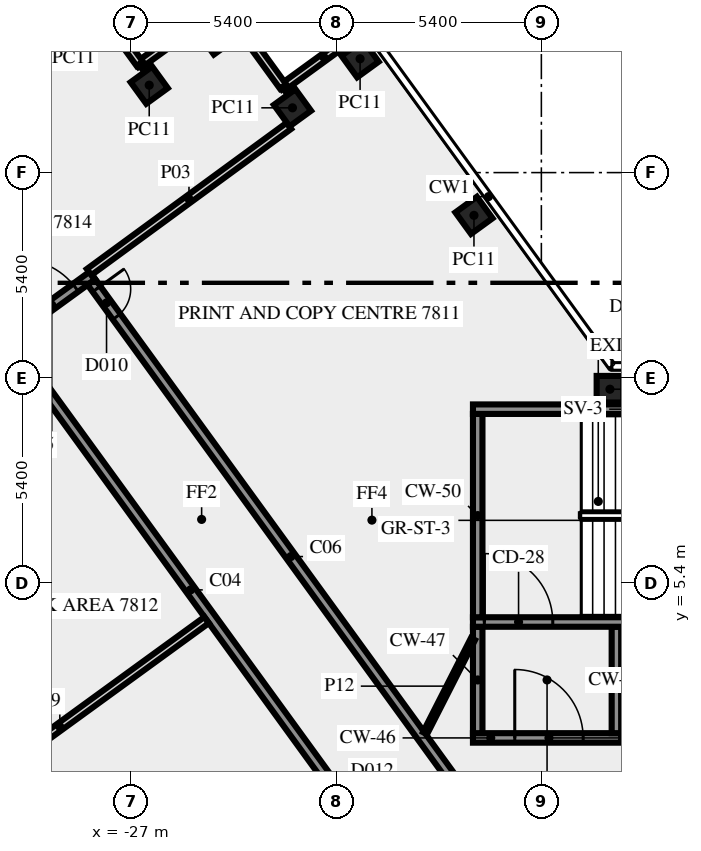
"""IFC4 building model, lengths in metres.
Left out: names, types, materials, properties, quantities, classifications, styles, units other than length and angle.
Written with IfcOpenShell. Run it as: python <this file> out.ifc"""

import sys

from ifc_helpers import new_model, si_unit, direction, frame, frame_2d, origin, origin_2d, place, context, subcontext, project, spatial, rectangle, extrude, element, fill, save


model = new_model("IFC4")
c1 = context("Model", 3, precision=1e-05, world=origin(), true_north=direction((0.0, 1.0)))
c2 = subcontext(c1, "Body", "Model", "MODEL_VIEW")
j1 = project(units=[si_unit("LENGTHUNIT", "METRE"), si_unit("PLANEANGLEUNIT", "RADIAN")], contexts=[c1])
p1 = place(None, origin())
s1 = spatial("IfcSite", under=j1, at=p1, CompositionType="ELEMENT")
p2 = place(p1, origin())
s2 = spatial("IfcBuilding", under=s1, at=p2, CompositionType="ELEMENT")
p3 = place(p2, frame((0.0, 0.0, 335.0)))
s3 = spatial("IfcBuildingStorey", under=s2, at=p3, CompositionType="ELEMENT", Elevation=335.0)
for number, where, z_axis, x_axis in (
    (1, (-17.974, 15.075, 0.0), (0.0, 0.0, 1.0), (-0.588, 0.809, 0.0)),
    (2, (-20.97, 19.195, 0.0), (0.0, 0.0, 1.0), (-0.588, 0.809, 0.0)),
    (3, (-22.749, 17.904, 0.0), (0.0, 0.0, 1.0), (-0.588, 0.809, 0.0)),
    (4, (-24.74, 19.795, 0.0), (0.0, 0.0, 1.0), (-0.588, 0.809, 0.0)),
    (5, (-26.519, 18.5, 0.0), (0.0, 0.0, 1.0), (-0.588, 0.809, 0.0)),
    (6, (-14.395, 10.5, 0.0), (0.0, 0.0, 1.0), (-1.0, 0.0, 0.0)),
):
    element("IfcColumn", number, at=place(p3, frame(where, z_axis=z_axis, x_axis=x_axis)), inside=s3, PredefinedType="COLUMN", context=c2, shape_type="SweptSolid", body=[
        extrude(rectangle(XDim=0.7, YDim=0.7, at=origin_2d()), origin(), (0.0, 0.0, 1.0), 3.65),
    ])
for number, where, z_axis, x_axis in (
    (7, (-20.829, 20.025, 0.0), (0.0, 0.0, 1.0), (-0.809, -0.588, 0.0)),
    (8, (-22.996, 18.466, 0.0), (0.0, 0.0, 1.0), (-0.588, 0.809, 0.0)),
):
    element("IfcWall", number, at=place(p3, frame(where, z_axis=z_axis, x_axis=x_axis)), inside=s3, PredefinedType="SOLIDWALL", context=c2, shape_type="SweptSolid", body=[
        extrude(rectangle(XDim=2.7, YDim=0.2, at=frame_2d((1.35, 0.0))), origin(), (0.0, 0.0, 1.0), 3.65),
    ])
for number, where, z_axis, x_axis in (
    (9, (-24.6, 20.623, 0.0), (0.0, 0.0, 1.0), (-0.809, -0.588, 0.0)),
    (10, (-26.768, 19.063, 0.0), (0.0, 0.0, 1.0), (-0.588, 0.809, 0.0)),
):
    element("IfcWall", number, at=place(p3, frame(where, z_axis=z_axis, x_axis=x_axis)), inside=s3, PredefinedType="SOLIDWALL", context=c2, shape_type="SweptSolid", body=[
        extrude(rectangle(XDim=2.7, YDim=0.2, at=frame_2d((1.35, 0.0))), origin(), (0.0, 0.0, 1.0), 3.65),
    ])
p4 = place(p3, frame((-18.0, 1.325, 0.0), z_axis=(0.0, 0.0, 1.0), x_axis=(1.0, 0.0, 0.0)))
e11 = element("IfcWall", 11, at=p4, inside=s3, PredefinedType="SHEAR", context=c2, shape_type="SweptSolid", body=[
    extrude(rectangle(XDim=3.9, YDim=0.25, at=frame_2d((1.95, 0.0))), origin(), (0.0, 0.0, 1.0), 3.65),
])
p5 = place(p4, frame((1.1, 0.0, 0.0)))
e12 = element("IfcOpeningElement", 12, at=p5, cuts=e11, PredefinedType="OPENING", context=c2, shape_type="SweptSolid", body=[
    extrude(rectangle(XDim=1.8, YDim=2.1, at=frame_2d((0.9, 1.05))), frame((0.0, 0.135, 0.0), z_axis=(0.0, -1.0, 0.0), x_axis=(1.0, 0.0, 0.0)), (0.0, 0.0, 1.0), 0.27),
])
for number, where, z_axis, x_axis in (
    (13, (-17.875, 1.45, 0.0), (0.0, 0.0, 1.0), (0.0, 1.0, 0.0)),
    (14, (-14.225, 1.45, 0.0), (0.0, 0.0, 1.0), (0.0, 1.0, 0.0)),
):
    element("IfcWall", number, at=place(p3, frame(where, z_axis=z_axis, x_axis=x_axis)), inside=s3, PredefinedType="SHEAR", context=c2, shape_type="SweptSolid", body=[
        extrude(rectangle(XDim=2.8, YDim=0.25, at=frame_2d((1.4, 0.0))), origin(), (0.0, 0.0, 1.0), 3.65),
    ])
p6 = place(p3, frame((-18.0, 4.375, 0.0), z_axis=(0.0, 0.0, 1.0), x_axis=(1.0, 0.0, 0.0)))
e15 = element("IfcWall", 15, at=p6, inside=s3, PredefinedType="SHEAR", context=c2, shape_type="SweptSolid", body=[
    extrude(rectangle(XDim=10.5, YDim=0.25, at=frame_2d((5.25, 0.0))), origin(), (0.0, 0.0, 1.0), 3.65),
])
p7 = place(p6, frame((0.3, 0.0, 0.0)))
e16 = element("IfcOpeningElement", 16, at=p7, cuts=e15, PredefinedType="OPENING", context=c2, shape_type="SweptSolid", body=[
    extrude(rectangle(XDim=1.8, YDim=2.1, at=frame_2d((0.9, 1.05))), frame((0.0, 0.135, 0.0), z_axis=(0.0, -1.0, 0.0), x_axis=(1.0, 0.0, 0.0)), (0.0, 0.0, 1.0), 0.27),
])
p8 = place(p3, frame((-17.875, 4.5, 0.0), z_axis=(0.0, 0.0, 1.0), x_axis=(0.0, 1.0, 0.0)))
e17 = element("IfcWall", 17, at=p8, inside=s3, PredefinedType="SHEAR", context=c2, shape_type="SweptSolid", body=[
    extrude(rectangle(XDim=5.35, YDim=0.25, at=frame_2d((2.675, 0.0))), origin(), (0.0, 0.0, 1.0), 3.65),
])
p9 = place(p3, frame((-18.0, 9.975, 0.0), z_axis=(0.0, 0.0, 1.0), x_axis=(1.0, 0.0, 0.0)))
e18 = element("IfcWall", 18, at=p9, inside=s3, PredefinedType="SHEAR", context=c2, shape_type="SweptSolid", body=[
    extrude(rectangle(XDim=10.5, YDim=0.25, at=frame_2d((5.25, 0.0))), origin(), (0.0, 0.0, 1.0), 3.65),
])
p10 = place(p9, frame((4.5, 0.0, 1.0)))
e19 = element("IfcOpeningElement", 19, at=p10, cuts=e18, PredefinedType="OPENING", context=c2, shape_type="SweptSolid", body=[
    extrude(rectangle(XDim=1.2, YDim=1.2, at=frame_2d((0.6, 0.6))), frame((0.0, 0.135, 0.0), z_axis=(0.0, -1.0, 0.0), x_axis=(1.0, 0.0, 0.0)), (0.0, 0.0, 1.0), 0.27),
])
p11 = place(p3, frame((-20.531, -1.523, 0.0), z_axis=(0.0, 0.0, 1.0), x_axis=(-0.587785867777, 0.809016547199, 0.0)))
e20 = element("IfcWall", 20, at=p11, inside=s3, PredefinedType="SOLIDWALL", context=c2, shape_type="SweptSolid", body=[
    extrude(rectangle(XDim=16.67, YDim=0.25, at=frame_2d((8.335, 0.0))), origin(), (0.0, 0.0, 1.0), 3.65),
])
p12 = place(p11, frame((0.533, 0.0, 0.0)))
e21 = element("IfcOpeningElement", 21, at=p12, cuts=e20, PredefinedType="OPENING", context=c2, shape_type="SweptSolid", body=[
    extrude(rectangle(XDim=0.9, YDim=2.1, at=frame_2d((0.45, 1.05))), frame((0.0, 0.135, 0.0), z_axis=(0.0, -1.0, 0.0), x_axis=(1.0, 0.0, 0.0)), (0.0, 0.0, 1.0), 0.27),
])
p13 = place(p11, frame((15.296, 0.0, 0.0)))
e22 = element("IfcOpeningElement", 22, at=p13, cuts=e20, PredefinedType="OPENING", context=c2, shape_type="SweptSolid", body=[
    extrude(rectangle(XDim=0.9, YDim=2.1, at=frame_2d((0.45, 1.05))), frame((0.0, 0.135, 0.0), z_axis=(0.0, -1.0, 0.0), x_axis=(1.0, 0.0, 0.0)), (0.0, 0.0, 1.0), 0.27),
])
p14 = place(p3, frame((-30.155, 11.936, 0.0), z_axis=(0.0, 0.0, 1.0), x_axis=(0.809038743598, 0.587755315891, 0.0)))
e23 = element("IfcWall", 23, at=p14, inside=s3, PredefinedType="SOLIDWALL", context=c2, shape_type="SweptSolid", body=[
    extrude(rectangle(XDim=2.65, YDim=0.25, at=frame_2d((1.325, 0.0))), origin(), (0.0, 0.0, 1.0), 3.65),
])
p15 = place(p14, frame((0.3, 0.0, 0.0)))
e24 = element("IfcOpeningElement", 24, at=p15, cuts=e23, PredefinedType="OPENING", context=c2, shape_type="SweptSolid", body=[
    extrude(rectangle(XDim=1.8, YDim=2.1, at=frame_2d((0.9, 1.05))), frame((0.0, 0.135, 0.0), z_axis=(0.0, -1.0, 0.0), x_axis=(1.0, 0.0, 0.0)), (0.0, 0.0, 1.0), 0.27),
])
p16 = place(p3, frame((-28.039, 13.319, 0.0), z_axis=(0.0, 0.0, 1.0), x_axis=(0.587791911753, -0.809012155952, 0.0)))
e25 = element("IfcWall", 25, at=p16, inside=s3, PredefinedType="SOLIDWALL", context=c2, shape_type="SweptSolid", body=[
    extrude(rectangle(XDim=17.853, YDim=0.25, at=frame_2d((8.927, 0.0))), origin(), (0.0, 0.0, 1.0), 3.65),
])
p17 = place(p16, frame((0.225, 0.0, 0.0)))
e26 = element("IfcOpeningElement", 26, at=p17, cuts=e25, PredefinedType="OPENING", context=c2, shape_type="SweptSolid", body=[
    extrude(rectangle(XDim=0.9, YDim=2.1, at=frame_2d((0.45, 1.05))), frame((0.0, 0.135, 0.0), z_axis=(0.0, -1.0, 0.0), x_axis=(1.0, 0.0, 0.0)), (0.0, 0.0, 1.0), 0.27),
])
p18 = place(p3, frame((-28.101, 13.583, 0.0), z_axis=(0.0, 0.0, 1.0), x_axis=(0.80699548015, 0.590557613631, 0.0)))
e27 = element("IfcWall", 27, at=p18, inside=s3, PredefinedType="SOLIDWALL", context=c2, shape_type="SweptSolid", body=[
    extrude(rectangle(XDim=6.515, YDim=0.2, at=frame_2d((3.258, 0.0))), origin(), (0.0, 0.0, 1.0), 3.65),
])
p19 = place(p3, frame((-25.008, 4.427, 0.0), z_axis=(0.0, 0.0, 1.0), x_axis=(-0.808994684961, -0.587815957341, 0.0)))
e28 = element("IfcWall", 28, at=p19, inside=s3, PredefinedType="SOLIDWALL", context=c2, shape_type="SweptSolid", body=[
    extrude(rectangle(XDim=9.55, YDim=0.2, at=frame_2d((4.775, 0.0))), origin(), (0.0, 0.0, 1.0), 2.95),
])
p20 = place(p3, frame((-19.261, 1.45, 0.0), z_axis=(0.0, 0.0, 1.0), x_axis=(0.453950796792, 0.891026752736, 0.0)))
e29 = element("IfcWall", 29, at=p20, inside=s3, PredefinedType="PARTITIONING", context=c2, shape_type="SweptSolid", body=[
    extrude(rectangle(XDim=2.778, YDim=0.12, at=frame_2d((1.389, 0.0))), origin(), (0.0, 0.0, 1.0), 3.65),
])
p21 = place(p5, origin())
e30 = element("IfcDoor", 30, at=p21, inside=s3, OperationType="DOUBLE_DOOR_SINGLE_SWING", PredefinedType="DOOR", context=c2, shape_type="SweptSolid", body=[
    extrude(rectangle(XDim=1.8, YDim=2.1, at=frame_2d((0.9, 1.05))), frame((0.0, 0.025, 0.0), z_axis=(0.0, -1.0, 0.0), x_axis=(1.0, 0.0, 0.0)), (0.0, 0.0, 1.0), 0.05),
])
fill(e12, e30)
p22 = place(p7, origin())
e31 = element("IfcDoor", 31, at=p22, inside=s3, OperationType="DOUBLE_DOOR_SINGLE_SWING", PredefinedType="DOOR", context=c2, shape_type="SweptSolid", body=[
    extrude(rectangle(XDim=1.8, YDim=2.1, at=frame_2d((0.9, 1.05))), frame((0.0, 0.025, 0.0), z_axis=(0.0, -1.0, 0.0), x_axis=(1.0, 0.0, 0.0)), (0.0, 0.0, 1.0), 0.05),
])
fill(e16, e31)
p23 = place(p15, origin())
e32 = element("IfcDoor", 32, at=p23, inside=s3, OperationType="DOUBLE_DOOR_SINGLE_SWING", PredefinedType="DOOR", context=c2, shape_type="SweptSolid", body=[
    extrude(rectangle(XDim=1.8, YDim=2.1, at=frame_2d((0.9, 1.05))), frame((0.0, 0.025, 0.0), z_axis=(0.0, -1.0, 0.0), x_axis=(1.0, 0.0, 0.0)), (0.0, 0.0, 1.0), 0.05),
])
fill(e24, e32)
p24 = place(p17, origin())
e33 = element("IfcDoor", 33, at=p24, inside=s3, OperationType="SINGLE_SWING_LEFT", PredefinedType="DOOR", context=c2, shape_type="SweptSolid", body=[
    extrude(rectangle(XDim=0.9, YDim=2.1, at=frame_2d((0.45, 1.05))), frame((0.0, 0.025, 0.0), z_axis=(0.0, -1.0, 0.0), x_axis=(1.0, 0.0, 0.0)), (0.0, 0.0, 1.0), 0.05),
])
fill(e26, e33)
save(model, sys.argv[1])
